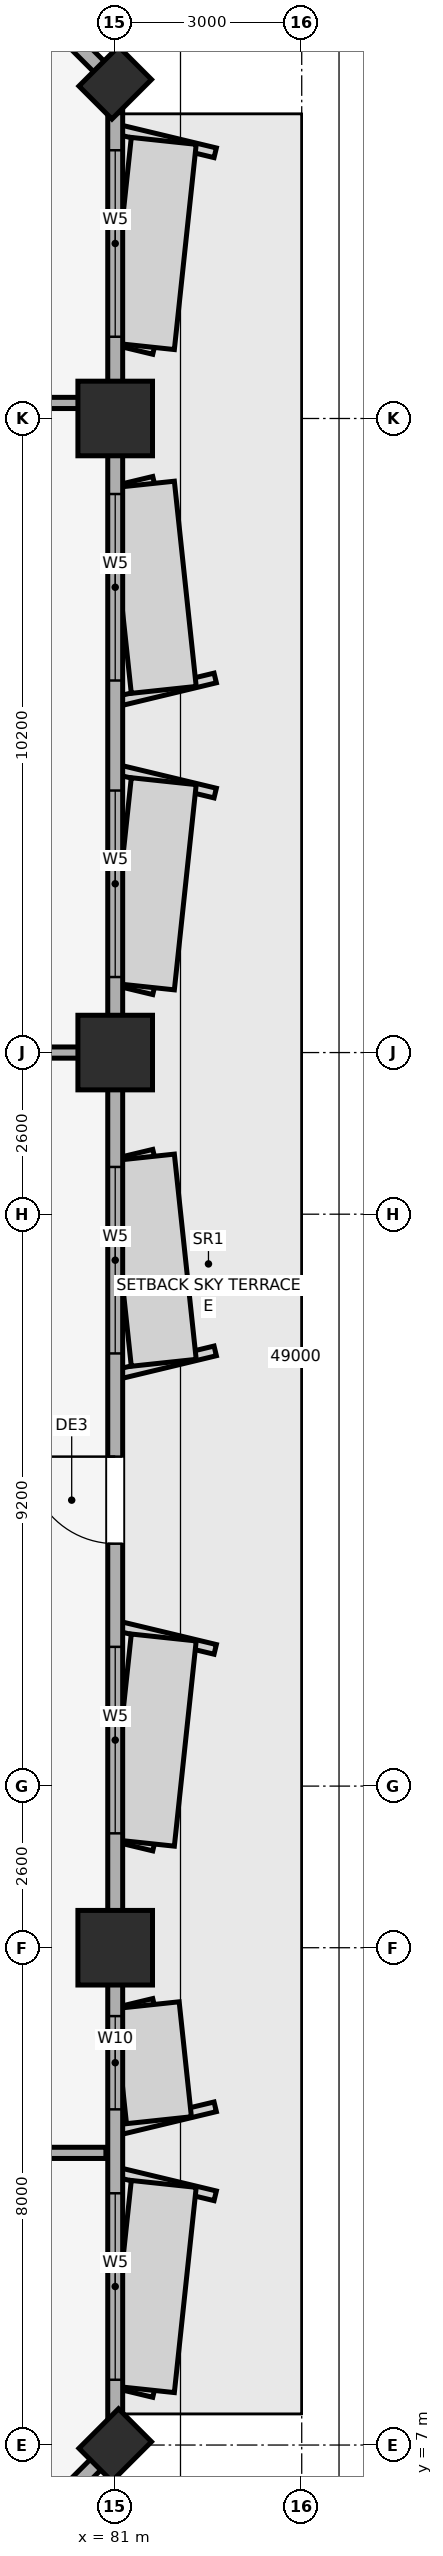
"""IFC4 building model, lengths in metres.
Left out: names, types, materials, properties, quantities, classifications, styles, units other than length and angle.
Written with IfcOpenShell. Run it as: python <this file> out.ifc"""

import sys

from ifc_helpers import new_model, si_unit, direction, frame, frame_2d, origin, origin_2d, place, context, subcontext, project, spatial, rectangle, extrude, element, fill, save


model = new_model("IFC4")
c1 = context("Model", 3, precision=1e-05, world=origin(), true_north=direction((0.0, 1.0)))
c2 = subcontext(c1, "Body", "Model", "MODEL_VIEW")
j1 = project(units=[si_unit("LENGTHUNIT", "METRE"), si_unit("PLANEANGLEUNIT", "RADIAN")], contexts=[c1])
p1 = place(None, origin())
s1 = spatial("IfcSite", under=j1, at=p1, CompositionType="ELEMENT")
p2 = place(p1, origin())
s2 = spatial("IfcBuilding", under=s1, at=p2, CompositionType="ELEMENT")
p3 = place(p2, frame((0.0, 0.0, 135.35)))
s3 = spatial("IfcBuildingStorey", under=s2, at=p3, CompositionType="ELEMENT", Elevation=135.35)
for number, where, z_axis, x_axis in (
    (1, (81.0, 15.0, 0.0), (0.0, 0.0, 1.0), (1.0, 0.0, 0.0)),
    (2, (81.0, 29.4, 0.0), (0.0, 0.0, 1.0), (1.0, 0.0, 0.0)),
    (3, (81.0, 39.6, 0.0), (0.0, 0.0, 1.0), (1.0, 0.0, 0.0)),
):
    element("IfcColumn", number, at=place(p3, frame(where, z_axis=z_axis, x_axis=x_axis)), inside=s3, PredefinedType="COLUMN", context=c2, shape_type="SweptSolid", body=[
        extrude(rectangle(XDim=1.2, YDim=1.2, at=origin_2d()), origin(), (0.0, 0.0, 1.0), 3.56),
    ])
for number, where, z_axis, x_axis in (
    (4, (81.0, 7.0, 0.0), (0.0, 0.0, 1.0), (0.707, 0.707, 0.0)),
    (5, (81.0, 45.0, 0.0), (0.0, 0.0, 1.0), (0.707, 0.707, 0.0)),
):
    element("IfcColumn", number, at=place(p3, frame(where, z_axis=z_axis, x_axis=x_axis)), inside=s3, PredefinedType="PILASTER", context=c2, shape_type="SweptSolid", body=[
        extrude(rectangle(XDim=0.9, YDim=0.75, at=origin_2d()), origin(), (0.0, 0.0, 1.0), 3.56),
    ])
p4 = place(p3, frame((77.0, 3.0, 0.0), z_axis=(0.0, 0.0, 1.0), x_axis=(0.707106781187, 0.707106781187, 0.0)))
e6 = element("IfcWall", 6, at=p4, inside=s3, PredefinedType="SOLIDWALL", context=c2, shape_type="SweptSolid", body=[
    extrude(rectangle(XDim=5.657, YDim=0.24, at=frame_2d((2.828, 0.0))), origin(), (0.0, 0.0, 1.0), 2.61),
])
p5 = place(p4, frame((1.778, 0.0, 0.85)))
e7 = element("IfcOpeningElement", 7, at=p5, cuts=e6, PredefinedType="OPENING", context=c2, shape_type="SweptSolid", body=[
    extrude(rectangle(XDim=2.1, YDim=1.6, at=frame_2d((1.05, 0.8))), frame((0.0, 0.13, 0.0), z_axis=(0.0, -1.0, 0.0), x_axis=(1.0, 0.0, 0.0)), (0.0, 0.0, 1.0), 0.26),
])
p6 = place(p3, frame((81.0, 7.0, 0.0), z_axis=(0.0, 0.0, 1.0), x_axis=(0.0, 1.0, 0.0)))
e8 = element("IfcWall", 8, at=p6, inside=s3, PredefinedType="SOLIDWALL", context=c2, shape_type="SweptSolid", body=[
    extrude(rectangle(XDim=38.0, YDim=0.24, at=frame_2d((19.0, 0.0))), origin(), (0.0, 0.0, 1.0), 2.61),
])
p7 = place(p6, frame((14.5, 0.0, 0.0)))
e9 = element("IfcOpeningElement", 9, at=p7, cuts=e8, PredefinedType="OPENING", context=c2, shape_type="SweptSolid", body=[
    extrude(rectangle(XDim=1.4, YDim=2.2, at=frame_2d((0.7, 1.1))), frame((0.0, 0.13, 0.0), z_axis=(0.0, -1.0, 0.0), x_axis=(1.0, 0.0, 0.0)), (0.0, 0.0, 1.0), 0.26),
])
p8 = place(p6, frame((1.05, 0.0, 0.85)))
e10 = element("IfcOpeningElement", 10, at=p8, cuts=e8, PredefinedType="OPENING", context=c2, shape_type="SweptSolid", body=[
    extrude(rectangle(XDim=3.0, YDim=1.5, at=frame_2d((1.5, 0.75))), frame((0.0, 0.13, 0.0), z_axis=(0.0, -1.0, 0.0), x_axis=(1.0, 0.0, 0.0)), (0.0, 0.0, 1.0), 0.26),
])
p9 = place(p6, frame((5.4, 0.0, 0.85)))
e11 = element("IfcOpeningElement", 11, at=p9, cuts=e8, PredefinedType="OPENING", context=c2, shape_type="SweptSolid", body=[
    extrude(rectangle(XDim=1.5, YDim=1.4, at=frame_2d((0.75, 0.7))), frame((0.0, 0.13, 0.0), z_axis=(0.0, -1.0, 0.0), x_axis=(1.0, 0.0, 0.0)), (0.0, 0.0, 1.0), 0.26),
])
p10 = place(p6, frame((9.84, 0.0, 0.85)))
e12 = element("IfcOpeningElement", 12, at=p10, cuts=e8, PredefinedType="OPENING", context=c2, shape_type="SweptSolid", body=[
    extrude(rectangle(XDim=3.0, YDim=1.5, at=frame_2d((1.5, 0.75))), frame((0.0, 0.13, 0.0), z_axis=(0.0, -1.0, 0.0), x_axis=(1.0, 0.0, 0.0)), (0.0, 0.0, 1.0), 0.26),
])
p11 = place(p6, frame((17.56, 0.0, 0.85)))
e13 = element("IfcOpeningElement", 13, at=p11, cuts=e8, PredefinedType="OPENING", context=c2, shape_type="SweptSolid", body=[
    extrude(rectangle(XDim=3.0, YDim=1.5, at=frame_2d((1.5, 0.75))), frame((0.0, 0.13, 0.0), z_axis=(0.0, -1.0, 0.0), x_axis=(1.0, 0.0, 0.0)), (0.0, 0.0, 1.0), 0.26),
])
p12 = place(p6, frame((23.615, 0.0, 0.85)))
e14 = element("IfcOpeningElement", 14, at=p12, cuts=e8, PredefinedType="OPENING", context=c2, shape_type="SweptSolid", body=[
    extrude(rectangle(XDim=3.0, YDim=1.5, at=frame_2d((1.5, 0.75))), frame((0.0, 0.13, 0.0), z_axis=(0.0, -1.0, 0.0), x_axis=(1.0, 0.0, 0.0)), (0.0, 0.0, 1.0), 0.26),
])
p13 = place(p6, frame((28.385, 0.0, 0.85)))
e15 = element("IfcOpeningElement", 15, at=p13, cuts=e8, PredefinedType="OPENING", context=c2, shape_type="SweptSolid", body=[
    extrude(rectangle(XDim=3.0, YDim=1.5, at=frame_2d((1.5, 0.75))), frame((0.0, 0.13, 0.0), z_axis=(0.0, -1.0, 0.0), x_axis=(1.0, 0.0, 0.0)), (0.0, 0.0, 1.0), 0.26),
])
p14 = place(p6, frame((33.915, 0.0, 0.85)))
e16 = element("IfcOpeningElement", 16, at=p14, cuts=e8, PredefinedType="OPENING", context=c2, shape_type="SweptSolid", body=[
    extrude(rectangle(XDim=3.0, YDim=1.5, at=frame_2d((1.5, 0.75))), frame((0.0, 0.13, 0.0), z_axis=(0.0, -1.0, 0.0), x_axis=(1.0, 0.0, 0.0)), (0.0, 0.0, 1.0), 0.26),
])
p15 = place(p3, frame((81.0, 45.0, 0.0), z_axis=(0.0, 0.0, 1.0), x_axis=(-0.707106781187, 0.707106781187, 0.0)))
e17 = element("IfcWall", 17, at=p15, inside=s3, PredefinedType="SOLIDWALL", context=c2, shape_type="SweptSolid", body=[
    extrude(rectangle(XDim=5.657, YDim=0.24, at=frame_2d((2.828, 0.0))), origin(), (0.0, 0.0, 1.0), 2.61),
])
p16 = place(p15, frame((1.778, 0.0, 0.85)))
e18 = element("IfcOpeningElement", 18, at=p16, cuts=e17, PredefinedType="OPENING", context=c2, shape_type="SweptSolid", body=[
    extrude(rectangle(XDim=2.1, YDim=1.6, at=frame_2d((1.05, 0.8))), frame((0.0, 0.13, 0.0), z_axis=(0.0, -1.0, 0.0), x_axis=(1.0, 0.0, 0.0)), (0.0, 0.0, 1.0), 0.26),
])
p17 = place(p3, frame((69.8, 11.7, 0.0), z_axis=(0.0, 0.0, 1.0), x_axis=(1.0, 0.0, 0.0)))
e19 = element("IfcWall", 19, at=p17, inside=s3, PredefinedType="PARTITIONING", context=c2, shape_type="SweptSolid", body=[
    extrude(rectangle(XDim=11.05, YDim=0.18, at=frame_2d((5.525, 0.0))), origin(), (0.0, 0.0, 1.0), 3.56),
])
p18 = place(p3, frame((69.8, 29.4, 0.0), z_axis=(0.0, 0.0, 1.0), x_axis=(1.0, 0.0, 0.0)))
e20 = element("IfcWall", 20, at=p18, inside=s3, PredefinedType="PARTITIONING", context=c2, shape_type="SweptSolid", body=[
    extrude(rectangle(XDim=11.05, YDim=0.18, at=frame_2d((5.525, 0.0))), origin(), (0.0, 0.0, 1.0), 2.91),
])
p19 = place(p3, frame((69.8, 39.85, 0.0), z_axis=(0.0, 0.0, 1.0), x_axis=(1.0, 0.0, 0.0)))
e21 = element("IfcWall", 21, at=p19, inside=s3, PredefinedType="PARTITIONING", context=c2, shape_type="SweptSolid", body=[
    extrude(rectangle(XDim=11.05, YDim=0.18, at=frame_2d((5.525, 0.0))), origin(), (0.0, 0.0, 1.0), 3.56),
])
p20 = place(p7, origin())
e22 = element("IfcDoor", 22, at=p20, inside=s3, OperationType="SINGLE_SWING_RIGHT", PredefinedType="DOOR", context=c2, shape_type="SweptSolid", body=[
    extrude(rectangle(XDim=1.4, YDim=2.2, at=frame_2d((0.7, 1.1))), frame((0.0, 0.025, 0.0), z_axis=(0.0, -1.0, 0.0), x_axis=(1.0, 0.0, 0.0)), (0.0, 0.0, 1.0), 0.05),
])
fill(e9, e22)
p21 = place(p8, origin())
e23 = element("IfcWindow", 23, at=p21, inside=s3, PartitioningType="SINGLE_PANEL", PredefinedType="WINDOW", context=c2, shape_type="SweptSolid", body=[
    extrude(rectangle(XDim=3.0, YDim=1.5, at=frame_2d((1.5, 0.75))), frame((0.0, 0.03, 0.0), z_axis=(0.0, -1.0, 0.0), x_axis=(1.0, 0.0, 0.0)), (0.0, 0.0, 1.0), 0.06),
])
fill(e10, e23)
p22 = place(p9, origin())
e24 = element("IfcWindow", 24, at=p22, inside=s3, PartitioningType="SINGLE_PANEL", PredefinedType="WINDOW", context=c2, shape_type="SweptSolid", body=[
    extrude(rectangle(XDim=1.5, YDim=1.4, at=frame_2d((0.75, 0.7))), frame((0.0, 0.03, 0.0), z_axis=(0.0, -1.0, 0.0), x_axis=(1.0, 0.0, 0.0)), (0.0, 0.0, 1.0), 0.06),
])
fill(e11, e24)
p23 = place(p10, origin())
e25 = element("IfcWindow", 25, at=p23, inside=s3, PartitioningType="SINGLE_PANEL", PredefinedType="WINDOW", context=c2, shape_type="SweptSolid", body=[
    extrude(rectangle(XDim=3.0, YDim=1.5, at=frame_2d((1.5, 0.75))), frame((0.0, 0.03, 0.0), z_axis=(0.0, -1.0, 0.0), x_axis=(1.0, 0.0, 0.0)), (0.0, 0.0, 1.0), 0.06),
])
fill(e12, e25)
p24 = place(p11, origin())
e26 = element("IfcWindow", 26, at=p24, inside=s3, PartitioningType="SINGLE_PANEL", PredefinedType="WINDOW", context=c2, shape_type="SweptSolid", body=[
    extrude(rectangle(XDim=3.0, YDim=1.5, at=frame_2d((1.5, 0.75))), frame((0.0, 0.03, 0.0), z_axis=(0.0, -1.0, 0.0), x_axis=(1.0, 0.0, 0.0)), (0.0, 0.0, 1.0), 0.06),
])
fill(e13, e26)
p25 = place(p12, origin())
e27 = element("IfcWindow", 27, at=p25, inside=s3, PartitioningType="SINGLE_PANEL", PredefinedType="WINDOW", context=c2, shape_type="SweptSolid", body=[
    extrude(rectangle(XDim=3.0, YDim=1.5, at=frame_2d((1.5, 0.75))), frame((0.0, 0.03, 0.0), z_axis=(0.0, -1.0, 0.0), x_axis=(1.0, 0.0, 0.0)), (0.0, 0.0, 1.0), 0.06),
])
fill(e14, e27)
p26 = place(p13, origin())
e28 = element("IfcWindow", 28, at=p26, inside=s3, PartitioningType="SINGLE_PANEL", PredefinedType="WINDOW", context=c2, shape_type="SweptSolid", body=[
    extrude(rectangle(XDim=3.0, YDim=1.5, at=frame_2d((1.5, 0.75))), frame((0.0, 0.03, 0.0), z_axis=(0.0, -1.0, 0.0), x_axis=(1.0, 0.0, 0.0)), (0.0, 0.0, 1.0), 0.06),
])
fill(e15, e28)
p27 = place(p14, origin())
e29 = element("IfcWindow", 29, at=p27, inside=s3, PartitioningType="SINGLE_PANEL", PredefinedType="WINDOW", context=c2, shape_type="SweptSolid", body=[
    extrude(rectangle(XDim=3.0, YDim=1.5, at=frame_2d((1.5, 0.75))), frame((0.0, 0.03, 0.0), z_axis=(0.0, -1.0, 0.0), x_axis=(1.0, 0.0, 0.0)), (0.0, 0.0, 1.0), 0.06),
])
fill(e16, e29)
save(model, sys.argv[1])
